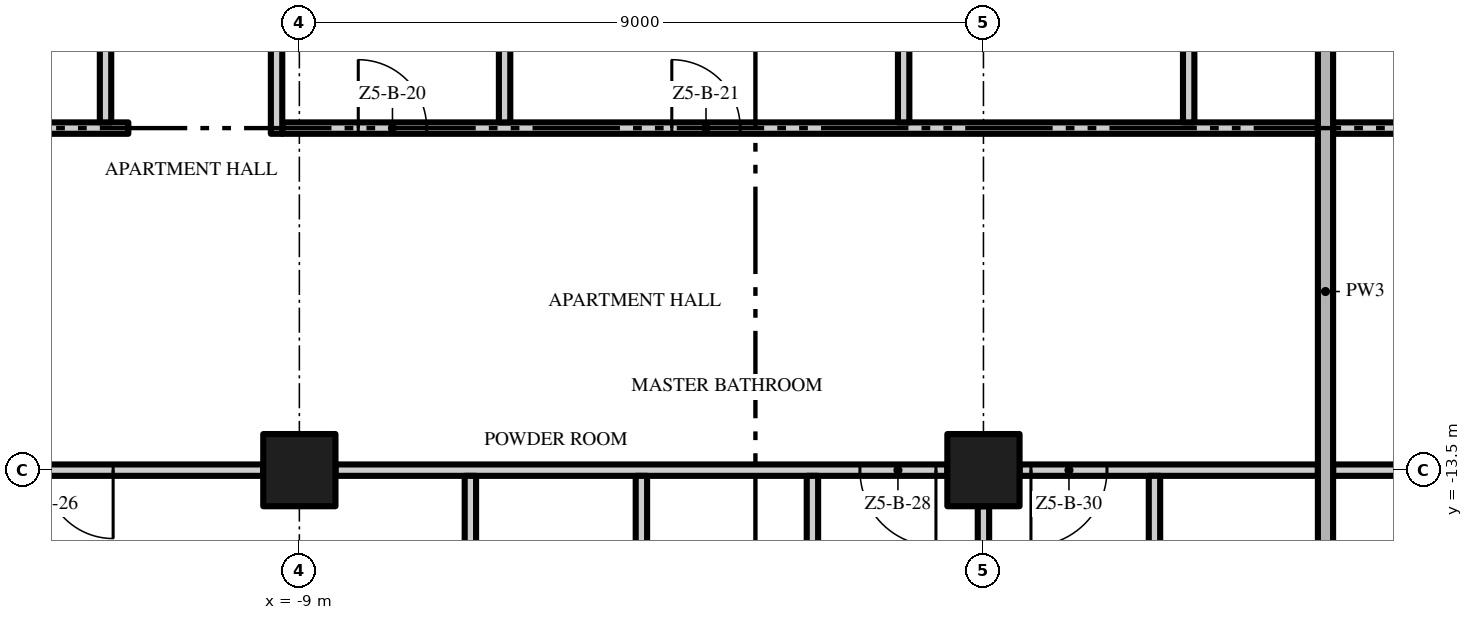
"""IFC4 building model, lengths in metres.
Left out: names, types, materials, properties, quantities, classifications, styles, units other than length and angle.
Written with IfcOpenShell. Run it as: python <this file> out.ifc"""

import sys

from ifc_helpers import new_model, si_unit, direction, frame, frame_2d, origin, origin_2d, place, context, subcontext, project, spatial, rectangle, extrude, element, fill, save


model = new_model("IFC4")
c1 = context("Model", 3, precision=1e-05, world=origin(), true_north=direction((0.0, 1.0)))
c2 = subcontext(c1, "Body", "Model", "MODEL_VIEW")
j1 = project(units=[si_unit("LENGTHUNIT", "METRE"), si_unit("PLANEANGLEUNIT", "RADIAN")], contexts=[c1])
p1 = place(None, origin())
s1 = spatial("IfcSite", under=j1, at=p1, CompositionType="ELEMENT")
p2 = place(p1, origin())
s2 = spatial("IfcBuilding", under=s1, at=p2, CompositionType="ELEMENT")
p3 = place(p2, frame((0.0, 0.0, 257.8)))
s3 = spatial("IfcBuildingStorey", under=s2, at=p3, CompositionType="ELEMENT", Elevation=257.8)
for number, where, z_axis, x_axis in (
    (1, (-9.0, -13.5, 0.0), (0.0, 0.0, 1.0), (1.0, 0.0, 0.0)),
    (2, (0.0, -13.5, 0.0), (0.0, 0.0, 1.0), (1.0, 0.0, 0.0)),
):
    element("IfcColumn", number, at=place(p3, frame(where, z_axis=z_axis, x_axis=x_axis)), inside=s3, PredefinedType="COLUMN", context=c2, shape_type="SweptSolid", body=[
        extrude(rectangle(XDim=0.95, YDim=0.95, at=origin_2d()), origin(), (0.0, 0.0, 1.0), 3.5),
    ])
p4 = place(p3, frame((-9.475, -13.5, 0.0), z_axis=(0.0, 0.0, 1.0), x_axis=(-1.0, 0.0, 0.0)))
e3 = element("IfcWall", 3, at=p4, inside=s3, PredefinedType="PARTITIONING", context=c2, shape_type="SweptSolid", body=[
    extrude(rectangle(XDim=8.05, YDim=0.15, at=frame_2d((4.025, 0.0))), origin(), (0.0, 0.0, 1.0), 3.5),
])
p5 = place(p4, frame((1.975, 0.0, 0.0)))
e4 = element("IfcOpeningElement", 4, at=p5, cuts=e3, PredefinedType="OPENING", context=c2, shape_type="SweptSolid", body=[
    extrude(rectangle(XDim=1.8, YDim=2.4, at=frame_2d((0.9, 1.2))), frame((0.0, 0.085, 0.0), z_axis=(0.0, -1.0, 0.0), x_axis=(1.0, 0.0, 0.0)), (0.0, 0.0, 1.0), 0.17),
])
p6 = place(p3, frame((-0.475, -13.5, 0.0), z_axis=(0.0, 0.0, 1.0), x_axis=(-1.0, 0.0, 0.0)))
e5 = element("IfcWall", 5, at=p6, inside=s3, PredefinedType="PARTITIONING", context=c2, shape_type="SweptSolid", body=[
    extrude(rectangle(XDim=8.05, YDim=0.15, at=frame_2d((4.025, 0.0))), origin(), (0.0, 0.0, 1.0), 3.5),
])
p7 = place(p6, frame((0.15, 0.0, 0.0)))
e6 = element("IfcOpeningElement", 6, at=p7, cuts=e5, PredefinedType="OPENING", context=c2, shape_type="SweptSolid", body=[
    extrude(rectangle(XDim=1.0, YDim=2.4, at=frame_2d((0.5, 1.2))), frame((0.0, 0.085, 0.0), z_axis=(0.0, -1.0, 0.0), x_axis=(1.0, 0.0, 0.0)), (0.0, 0.0, 1.0), 0.17),
])
p8 = place(p3, frame((4.4, -13.5, 0.0), z_axis=(0.0, 0.0, 1.0), x_axis=(-1.0, 0.0, 0.0)))
e7 = element("IfcWall", 7, at=p8, inside=s3, PredefinedType="PARTITIONING", context=c2, shape_type="SweptSolid", body=[
    extrude(rectangle(XDim=3.925, YDim=0.15, at=frame_2d((1.962, 0.0))), origin(), (0.0, 0.0, 1.0), 3.5),
])
p9 = place(p8, frame((2.775, 0.0, 0.0)))
e8 = element("IfcOpeningElement", 8, at=p9, cuts=e7, PredefinedType="OPENING", context=c2, shape_type="SweptSolid", body=[
    extrude(rectangle(XDim=1.0, YDim=2.4, at=frame_2d((0.5, 1.2))), frame((0.0, 0.085, 0.0), z_axis=(0.0, -1.0, 0.0), x_axis=(1.0, 0.0, 0.0)), (0.0, 0.0, 1.0), 0.17),
])
p10 = place(p3, frame((4.6, -13.5, 0.0), z_axis=(0.0, 0.0, 1.0), x_axis=(1.0, 0.0, 0.0)))
e9 = element("IfcWall", 9, at=p10, inside=s3, PredefinedType="PARTITIONING", context=c2, shape_type="SweptSolid", body=[
    extrude(rectangle(XDim=3.925, YDim=0.15, at=frame_2d((1.962, 0.0))), origin(), (0.0, 0.0, 1.0), 3.5),
])
p11 = place(p3, frame((-26.7, -9.0, 0.0), z_axis=(0.0, 0.0, 1.0), x_axis=(1.0, 0.0, 0.0)))
e10 = element("IfcWall", 10, at=p11, inside=s3, PredefinedType="PARTITIONING", context=c2, shape_type="SweptSolid", body=[
    extrude(rectangle(XDim=15.45, YDim=0.15, at=frame_2d((7.725, 0.0))), origin(), (0.0, 0.0, 1.0), 3.5),
])
p12 = place(p11, frame((9.4, 0.0, 0.0)))
e11 = element("IfcOpeningElement", 11, at=p12, cuts=e10, PredefinedType="OPENING", context=c2, shape_type="SweptSolid", body=[
    extrude(rectangle(XDim=1.0, YDim=2.4, at=frame_2d((0.5, 1.2))), frame((0.0, 0.085, 0.0), z_axis=(0.0, -1.0, 0.0), x_axis=(1.0, 0.0, 0.0)), (0.0, 0.0, 1.0), 0.17),
])
p13 = place(p3, frame((-9.225, -9.0, 0.0), z_axis=(0.0, 0.0, 1.0), x_axis=(1.0, 0.0, 0.0)))
e12 = element("IfcWall", 12, at=p13, inside=s3, PredefinedType="PARTITIONING", context=c2, shape_type="SweptSolid", body=[
    extrude(rectangle(XDim=13.625, YDim=0.15, at=frame_2d((6.812, 0.0))), origin(), (0.0, 0.0, 1.0), 3.5),
])
p14 = place(p13, frame((1.0, 0.0, 0.0)))
e13 = element("IfcOpeningElement", 13, at=p14, cuts=e12, PredefinedType="OPENING", context=c2, shape_type="SweptSolid", body=[
    extrude(rectangle(XDim=0.9, YDim=2.1, at=frame_2d((0.45, 1.05))), frame((0.0, 0.085, 0.0), z_axis=(0.0, -1.0, 0.0), x_axis=(1.0, 0.0, 0.0)), (0.0, 0.0, 1.0), 0.17),
])
p15 = place(p13, frame((5.125, 0.0, 0.0)))
e14 = element("IfcOpeningElement", 14, at=p15, cuts=e12, PredefinedType="OPENING", context=c2, shape_type="SweptSolid", body=[
    extrude(rectangle(XDim=0.9, YDim=2.1, at=frame_2d((0.45, 1.05))), frame((0.0, 0.085, 0.0), z_axis=(0.0, -1.0, 0.0), x_axis=(1.0, 0.0, 0.0)), (0.0, 0.0, 1.0), 0.17),
])
p16 = place(p3, frame((4.6, -9.0, 0.0), z_axis=(0.0, 0.0, 1.0), x_axis=(1.0, 0.0, 0.0)))
e15 = element("IfcWall", 15, at=p16, inside=s3, PredefinedType="PARTITIONING", context=c2, shape_type="SweptSolid", body=[
    extrude(rectangle(XDim=8.075, YDim=0.15, at=frame_2d((4.037, 0.0))), origin(), (0.0, 0.0, 1.0), 3.5),
])
p17 = place(p16, frame((2.4, 0.0, 0.0)))
e16 = element("IfcOpeningElement", 16, at=p17, cuts=e15, PredefinedType="OPENING", context=c2, shape_type="SweptSolid", body=[
    extrude(rectangle(XDim=1.0, YDim=2.4, at=frame_2d((0.5, 1.2))), frame((0.0, 0.085, 0.0), z_axis=(0.0, -1.0, 0.0), x_axis=(1.0, 0.0, 0.0)), (0.0, 0.0, 1.0), 0.17),
])
p18 = place(p3, frame((-11.55, -8.925, 0.0), z_axis=(0.0, 0.0, 1.0), x_axis=(0.0, 1.0, 0.0)))
e17 = element("IfcWall", 17, at=p18, inside=s3, PredefinedType="PARTITIONING", context=c2, shape_type="SweptSolid", body=[
    extrude(rectangle(XDim=4.5, YDim=0.15, at=frame_2d((2.25, 0.0))), origin(), (0.0, 0.0, 1.0), 3.5),
])
p19 = place(p18, frame((1.75, 0.0, 0.0)))
e18 = element("IfcOpeningElement", 18, at=p19, cuts=e17, PredefinedType="OPENING", context=c2, shape_type="SweptSolid", body=[
    extrude(rectangle(XDim=0.9, YDim=2.1, at=frame_2d((0.45, 1.05))), frame((0.0, 0.085, 0.0), z_axis=(0.0, -1.0, 0.0), x_axis=(1.0, 0.0, 0.0)), (0.0, 0.0, 1.0), 0.17),
])
p20 = place(p3, frame((-9.3, -9.075, 0.0), z_axis=(0.0, 0.0, 1.0), x_axis=(0.0, 1.0, 0.0)))
e19 = element("IfcWall", 19, at=p20, inside=s3, PredefinedType="PARTITIONING", context=c2, shape_type="SweptSolid", body=[
    extrude(rectangle(XDim=4.1, YDim=0.15, at=frame_2d((2.05, 0.0))), origin(), (0.0, 0.0, 1.0), 3.5),
])
p21 = place(p3, frame((-6.75, -16.575, 0.0), z_axis=(0.0, 0.0, 1.0), x_axis=(0.0, 1.0, 0.0)))
e20 = element("IfcWall", 20, at=p21, inside=s3, PredefinedType="PARTITIONING", context=c2, shape_type="SweptSolid", body=[
    extrude(rectangle(XDim=3.0, YDim=0.15, at=frame_2d((1.5, 0.0))), origin(), (0.0, 0.0, 1.0), 3.5),
])
p22 = place(p3, frame((-6.3, -8.925, 0.0), z_axis=(0.0, 0.0, 1.0), x_axis=(0.0, 1.0, 0.0)))
e21 = element("IfcWall", 21, at=p22, inside=s3, PredefinedType="PARTITIONING", context=c2, shape_type="SweptSolid", body=[
    extrude(rectangle(XDim=4.35, YDim=0.15, at=frame_2d((2.175, 0.0))), origin(), (0.0, 0.0, 1.0), 3.5),
])
p23 = place(p3, frame((-4.5, -22.2, 0.0), z_axis=(0.0, 0.0, 1.0), x_axis=(0.0, 1.0, 0.0)))
e22 = element("IfcWall", 22, at=p23, inside=s3, PredefinedType="PARTITIONING", context=c2, shape_type="SweptSolid", body=[
    extrude(rectangle(XDim=8.625, YDim=0.15, at=frame_2d((4.312, 0.0))), origin(), (0.0, 0.0, 1.0), 3.5),
])
p24 = place(p3, frame((-2.25, -16.575, 0.0), z_axis=(0.0, 0.0, 1.0), x_axis=(0.0, 1.0, 0.0)))
e23 = element("IfcWall", 23, at=p24, inside=s3, PredefinedType="PARTITIONING", context=c2, shape_type="SweptSolid", body=[
    extrude(rectangle(XDim=3.0, YDim=0.15, at=frame_2d((1.5, 0.0))), origin(), (0.0, 0.0, 1.0), 3.5),
])
p25 = place(p3, frame((-1.05, -4.575, 0.0), z_axis=(0.0, 0.0, 1.0), x_axis=(0.0, -1.0, 0.0)))
e24 = element("IfcWall", 24, at=p25, inside=s3, PredefinedType="PARTITIONING", context=c2, shape_type="SweptSolid", body=[
    extrude(rectangle(XDim=4.35, YDim=0.15, at=frame_2d((2.175, 0.0))), origin(), (0.0, 0.0, 1.0), 3.5),
])
p26 = place(p25, frame((1.7, 0.0, 0.0)))
e25 = element("IfcOpeningElement", 25, at=p26, cuts=e24, PredefinedType="OPENING", context=c2, shape_type="SweptSolid", body=[
    extrude(rectangle(XDim=0.9, YDim=2.1, at=frame_2d((0.45, 1.05))), frame((0.0, 0.085, 0.0), z_axis=(0.0, -1.0, 0.0), x_axis=(1.0, 0.0, 0.0)), (0.0, 0.0, 1.0), 0.17),
])
p27 = place(p3, frame((0.0, -21.6, 0.0), z_axis=(0.0, 0.0, 1.0), x_axis=(0.0, 1.0, 0.0)))
e26 = element("IfcWall", 26, at=p27, inside=s3, PredefinedType="PARTITIONING", context=c2, shape_type="SweptSolid", body=[
    extrude(rectangle(XDim=7.625, YDim=0.15, at=frame_2d((3.812, 0.0))), origin(), (0.0, 0.0, 1.0), 3.5),
])
p28 = place(p3, frame((2.25, -16.575, 0.0), z_axis=(0.0, 0.0, 1.0), x_axis=(0.0, 1.0, 0.0)))
e27 = element("IfcWall", 27, at=p28, inside=s3, PredefinedType="PARTITIONING", context=c2, shape_type="SweptSolid", body=[
    extrude(rectangle(XDim=3.0, YDim=0.15, at=frame_2d((1.5, 0.0))), origin(), (0.0, 0.0, 1.0), 3.5),
])
p29 = place(p3, frame((2.7, -8.925, 0.0), z_axis=(0.0, 0.0, 1.0), x_axis=(0.0, 1.0, 0.0)))
e28 = element("IfcWall", 28, at=p29, inside=s3, PredefinedType="PARTITIONING", context=c2, shape_type="SweptSolid", body=[
    extrude(rectangle(XDim=4.35, YDim=0.15, at=frame_2d((2.175, 0.0))), origin(), (0.0, 0.0, 1.0), 3.5),
])
p30 = place(p3, frame((4.5, -22.2, 0.0), z_axis=(0.0, 0.0, 1.0), x_axis=(0.0, 1.0, 0.0)))
e29 = element("IfcWall", 29, at=p30, inside=s3, PredefinedType="PARTITIONING", context=c2, shape_type="SweptSolid", body=[
    extrude(rectangle(XDim=22.1, YDim=0.2, at=frame_2d((11.05, 0.0))), origin(), (0.0, 0.0, 1.0), 3.5),
])
p31 = place(p14, origin())
e30 = element("IfcDoor", 30, at=p31, inside=s3, OperationType="SINGLE_SWING_LEFT", PredefinedType="DOOR", context=c2, shape_type="SweptSolid", body=[
    extrude(rectangle(XDim=0.9, YDim=2.1, at=frame_2d((0.45, 1.05))), frame((0.0, 0.025, 0.0), z_axis=(0.0, -1.0, 0.0), x_axis=(1.0, 0.0, 0.0)), (0.0, 0.0, 1.0), 0.05),
])
fill(e13, e30)
p32 = place(p15, origin())
e31 = element("IfcDoor", 31, at=p32, inside=s3, OperationType="SINGLE_SWING_LEFT", PredefinedType="DOOR", context=c2, shape_type="SweptSolid", body=[
    extrude(rectangle(XDim=0.9, YDim=2.1, at=frame_2d((0.45, 1.05))), frame((0.0, 0.025, 0.0), z_axis=(0.0, -1.0, 0.0), x_axis=(1.0, 0.0, 0.0)), (0.0, 0.0, 1.0), 0.05),
])
fill(e14, e31)
p33 = place(p5, origin())
e32 = element("IfcDoor", 32, at=p33, inside=s3, OperationType="DOUBLE_DOOR_SINGLE_SWING", PredefinedType="DOOR", context=c2, shape_type="SweptSolid", body=[
    extrude(rectangle(XDim=1.8, YDim=2.4, at=frame_2d((0.9, 1.2))), frame((0.0, 0.025, 0.0), z_axis=(0.0, -1.0, 0.0), x_axis=(1.0, 0.0, 0.0)), (0.0, 0.0, 1.0), 0.05),
])
fill(e4, e32)
p34 = place(p7, origin())
e33 = element("IfcDoor", 33, at=p34, inside=s3, OperationType="SINGLE_SWING_LEFT", PredefinedType="DOOR", context=c2, shape_type="SweptSolid", body=[
    extrude(rectangle(XDim=1.0, YDim=2.4, at=frame_2d((0.5, 1.2))), frame((0.0, 0.025, 0.0), z_axis=(0.0, -1.0, 0.0), x_axis=(1.0, 0.0, 0.0)), (0.0, 0.0, 1.0), 0.05),
])
fill(e6, e33)
p35 = place(p9, origin())
e34 = element("IfcDoor", 34, at=p35, inside=s3, OperationType="SINGLE_SWING_RIGHT", PredefinedType="DOOR", context=c2, shape_type="SweptSolid", body=[
    extrude(rectangle(XDim=1.0, YDim=2.4, at=frame_2d((0.5, 1.2))), frame((0.0, 0.025, 0.0), z_axis=(0.0, -1.0, 0.0), x_axis=(1.0, 0.0, 0.0)), (0.0, 0.0, 1.0), 0.05),
])
fill(e8, e34)
save(model, sys.argv[1])
